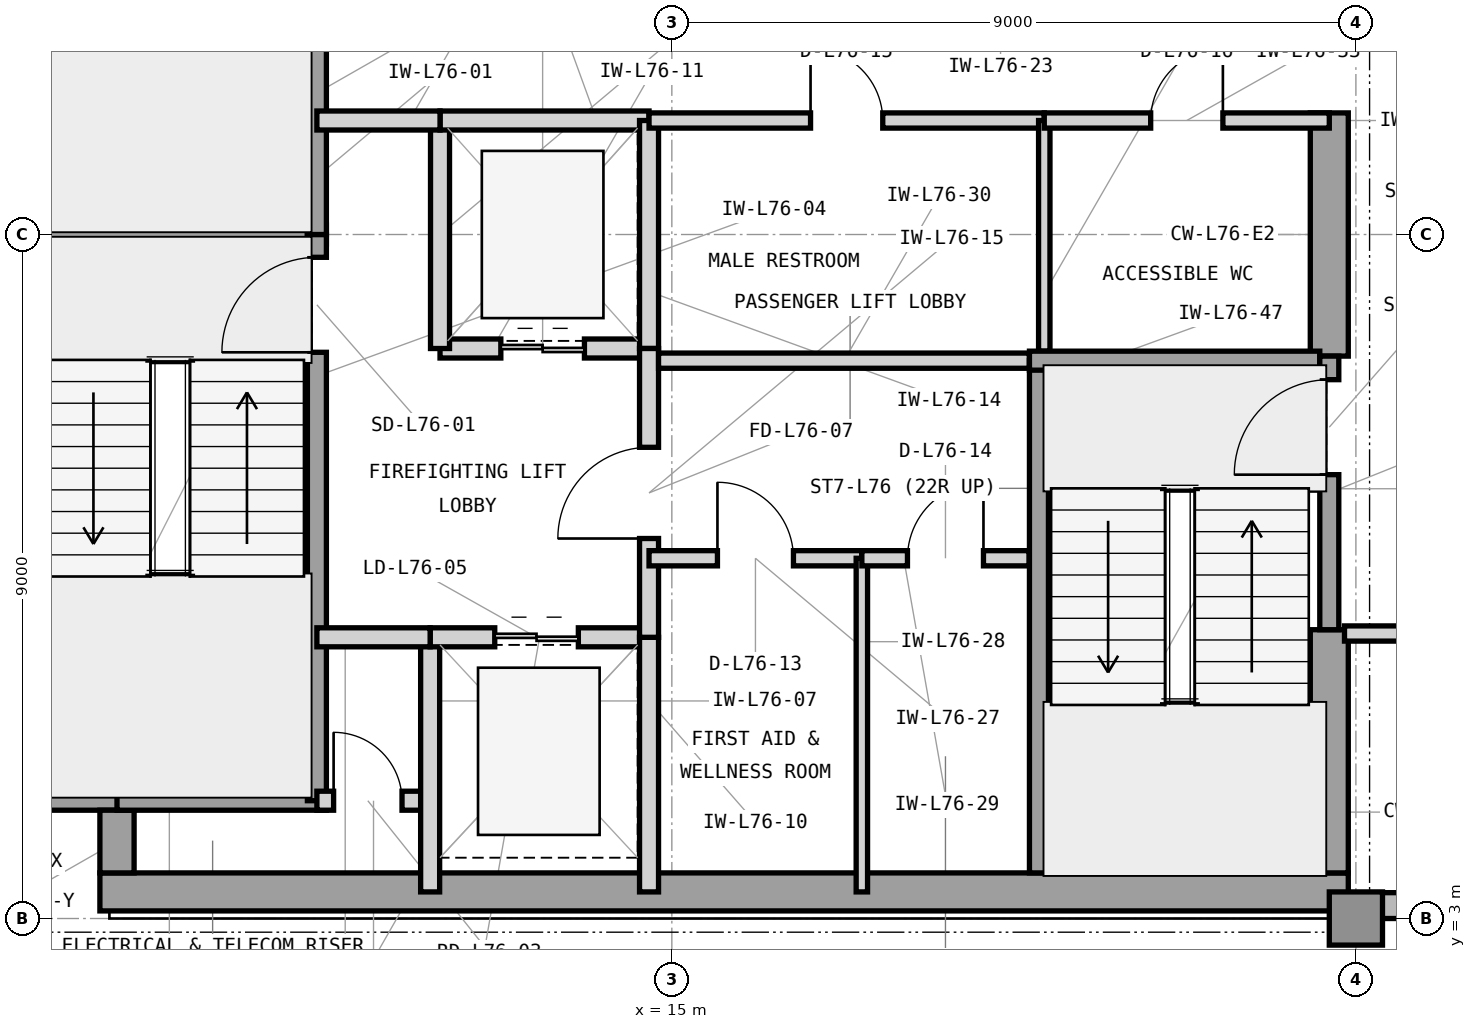
"""IFC4 building model, lengths in metres.
Left out: names, types, materials, properties, quantities, classifications, styles, units other than length and angle.
Written with IfcOpenShell. Run it as: python <this file> out.ifc"""

import sys

from ifc_helpers import new_model, si_unit, direction, frame, frame_2d, origin, origin_2d, place, context, subcontext, project, spatial, rectangle, extrude, element, fill, save


model = new_model("IFC4")
c1 = context("Model", 3, precision=1e-05, world=origin(), true_north=direction((0.0, 1.0)))
c2 = subcontext(c1, "Body", "Model", "MODEL_VIEW")
j1 = project(units=[si_unit("LENGTHUNIT", "METRE"), si_unit("PLANEANGLEUNIT", "RADIAN")], contexts=[c1])
p1 = place(None, origin())
s1 = spatial("IfcSite", under=j1, at=p1, CompositionType="ELEMENT")
p2 = place(p1, origin())
s2 = spatial("IfcBuilding", under=s1, at=p2, CompositionType="ELEMENT")
p3 = place(p2, frame((0.0, 0.0, 309.3)))
s3 = spatial("IfcBuildingStorey", under=s2, at=p3, CompositionType="ELEMENT", Elevation=309.3)
p4 = place(p3, frame((7.475, 3.35, 0.0), z_axis=(0.0, 0.0, 1.0), x_axis=(1.0, 0.0, 0.0)))
e1 = element("IfcWall", 1, at=p4, inside=s3, PredefinedType="SHEAR", context=c2, shape_type="SweptSolid", body=[
    extrude(rectangle(XDim=16.425, YDim=0.5, at=frame_2d((8.212, 0.0))), origin(), (0.0, 0.0, 1.0), 3.9),
])
p5 = place(p3, frame((23.65, 3.6, 0.0), z_axis=(0.0, 0.0, 1.0), x_axis=(0.0, 1.0, 0.0)))
e2 = element("IfcWall", 2, at=p5, inside=s3, PredefinedType="SHEAR", context=c2, shape_type="SweptSolid", body=[
    extrude(rectangle(XDim=3.2, YDim=0.5, at=frame_2d((1.6, 0.0))), origin(), (0.0, 0.0, 1.0), 3.9),
])
p6 = place(p3, frame((23.65, 10.4, 0.0), z_axis=(0.0, 0.0, 1.0), x_axis=(0.0, 1.0, 0.0)))
e3 = element("IfcWall", 3, at=p6, inside=s3, PredefinedType="SHEAR", context=c2, shape_type="SweptSolid", body=[
    extrude(rectangle(XDim=3.2, YDim=0.5, at=frame_2d((1.6, 0.0))), origin(), (0.0, 0.0, 1.0), 3.9),
])
p7 = place(p3, frame((6.6, 4.65, 0.0), z_axis=(0.0, 0.0, 1.0), x_axis=(1.0, 0.0, 0.0)))
e4 = element("IfcWall", 4, at=p7, inside=s3, PredefinedType="SHEAR", context=c2, shape_type="SweptSolid", body=[
    extrude(rectangle(XDim=1.325, YDim=0.45, at=frame_2d((0.663, 0.0))), origin(), (0.0, 0.0, 1.0), 3.9),
])
p8 = place(p3, frame((7.7, 3.6, 0.0), z_axis=(0.0, 0.0, 1.0), x_axis=(0.0, 1.0, 0.0)))
e5 = element("IfcWall", 5, at=p8, inside=s3, PredefinedType="SHEAR", context=c2, shape_type="SweptSolid", body=[
    extrude(rectangle(XDim=0.825, YDim=0.45, at=frame_2d((0.413, 0.0))), origin(), (0.0, 0.0, 1.0), 3.9),
])
p9 = place(p3, frame((24.0, 3.0, 0.0), z_axis=(0.0, 0.0, 1.0), x_axis=(1.0, 0.0, 0.0)))
e6 = element("IfcColumn", 6, at=p9, inside=s3, PredefinedType="COLUMN", context=c2, shape_type="SweptSolid", body=[
    extrude(rectangle(XDim=0.7, YDim=0.7, at=origin_2d()), origin(), (0.0, 0.0, 1.0), 3.9),
])
p10 = place(p3, frame((23.9, 3.17, 0.0), z_axis=(0.0, 0.0, 1.0), x_axis=(1.0, 0.0, 0.0)))
e7 = element("IfcWall", 7, at=p10, inside=s3, PredefinedType="STANDARD", context=c2, shape_type="SweptSolid", body=[
    extrude(rectangle(XDim=25.5, YDim=0.34, at=frame_2d((12.75, 0.0))), origin(), (0.0, 0.0, 1.0), 3.62),
])
p11 = place(p10, frame((1.6, 0.0, 0.8)))
e8 = element("IfcOpeningElement", 8, at=p11, cuts=e7, PredefinedType="OPENING", context=c2, shape_type="SweptSolid", body=[
    extrude(rectangle(XDim=1.9, YDim=2.35, at=frame_2d((0.95, 1.175))), frame((0.0, 0.18, 0.0), z_axis=(0.0, -1.0, 0.0), x_axis=(1.0, 0.0, 0.0)), (0.0, 0.0, 1.0), 0.36),
])
p12 = place(p10, frame((11.45, 0.0, 0.8)))
e9 = element("IfcOpeningElement", 9, at=p12, cuts=e7, PredefinedType="OPENING", context=c2, shape_type="SweptSolid", body=[
    extrude(rectangle(XDim=2.6, YDim=2.35, at=frame_2d((1.3, 1.175))), frame((0.0, 0.18, 0.0), z_axis=(0.0, -1.0, 0.0), x_axis=(1.0, 0.0, 0.0)), (0.0, 0.0, 1.0), 0.36),
])
p13 = place(p10, frame((18.625, 0.0, 0.8)))
e10 = element("IfcOpeningElement", 10, at=p13, cuts=e7, PredefinedType="OPENING", context=c2, shape_type="SweptSolid", body=[
    extrude(rectangle(XDim=1.9, YDim=2.35, at=frame_2d((0.95, 1.175))), frame((0.0, 0.18, 0.0), z_axis=(0.0, -1.0, 0.0), x_axis=(1.0, 0.0, 0.0)), (0.0, 0.0, 1.0), 0.36),
])
p14 = place(p3, frame((6.35, 12.0, 0.0), z_axis=(0.0, 0.0, 1.0), x_axis=(1.0, 0.0, 0.0)))
e11 = element("IfcWall", 11, at=p14, inside=s3, PredefinedType="SHEAR", context=c2, shape_type="SweptSolid", body=[
    extrude(rectangle(XDim=4.105, YDim=0.25, at=frame_2d((2.052, 0.0))), origin(), (0.0, 0.0, 1.0), 3.9),
])
p15 = place(p3, frame((7.7, 4.55, 0.0), z_axis=(0.0, 0.0, 1.0), x_axis=(1.0, 0.0, 0.0)))
e12 = element("IfcWall", 12, at=p15, inside=s3, PredefinedType="SHEAR", context=c2, shape_type="SweptSolid", body=[
    extrude(rectangle(XDim=2.755, YDim=0.25, at=frame_2d((1.377, 0.0))), origin(), (0.0, 0.0, 1.0), 3.9),
])
p16 = place(p3, frame((10.33, 4.55, 0.0), z_axis=(0.0, 0.0, 1.0), x_axis=(0.0, 1.0, 0.0)))
e13 = element("IfcWall", 13, at=p16, inside=s3, PredefinedType="SHEAR", context=c2, shape_type="SweptSolid", body=[
    extrude(rectangle(XDim=7.45, YDim=0.25, at=frame_2d((3.725, 0.0))), origin(), (0.0, 0.0, 1.0), 3.9),
])
p17 = place(p16, frame((5.9, 0.0, 0.0)))
e14 = element("IfcOpeningElement", 14, at=p17, cuts=e13, PredefinedType="OPENING", context=c2, shape_type="SweptSolid", body=[
    extrude(rectangle(XDim=1.25, YDim=2.2, at=frame_2d((0.625, 1.1))), frame((0.0, 0.135, 0.0), z_axis=(0.0, -1.0, 0.0), x_axis=(1.0, 0.0, 0.0)), (0.0, 0.0, 1.0), 0.27),
])
p18 = place(p3, frame((10.33, 12.0, 0.0), z_axis=(0.0, 0.0, 1.0), x_axis=(0.0, 1.0, 0.0)))
e15 = element("IfcWall", 15, at=p18, inside=s3, PredefinedType="SHEAR", context=c2, shape_type="SweptSolid", body=[
    extrude(rectangle(XDim=7.45, YDim=0.25, at=frame_2d((3.725, 0.0))), origin(), (0.0, 0.0, 1.0), 3.9),
])
p19 = place(p18, frame((5.85, 0.0, 0.0)))
e16 = element("IfcOpeningElement", 16, at=p19, cuts=e15, PredefinedType="OPENING", context=c2, shape_type="SweptSolid", body=[
    extrude(rectangle(XDim=1.25, YDim=2.2, at=frame_2d((0.625, 1.1))), frame((0.0, 0.135, 0.0), z_axis=(0.0, -1.0, 0.0), x_axis=(1.0, 0.0, 0.0)), (0.0, 0.0, 1.0), 0.27),
])
p20 = place(p3, frame((10.33, 4.55, 0.0), z_axis=(0.0, 0.0, 1.0), x_axis=(1.0, 0.0, 0.0)))
e17 = element("IfcWall", 17, at=p20, inside=s3, PredefinedType="PARTITIONING", context=c2, shape_type="SweptSolid", body=[
    extrude(rectangle(XDim=1.49, YDim=0.25, at=frame_2d((0.745, 0.0))), origin(), (0.0, 0.0, 1.0), 3.61),
])
p21 = place(p20, frame((0.22, 0.0, 0.0)))
e18 = element("IfcOpeningElement", 18, at=p21, cuts=e17, PredefinedType="OPENING", context=c2, shape_type="SweptSolid", body=[
    extrude(rectangle(XDim=0.9, YDim=2.1, at=frame_2d((0.45, 1.05))), frame((0.0, 0.135, 0.0), z_axis=(0.0, -1.0, 0.0), x_axis=(1.0, 0.0, 0.0)), (0.0, 0.0, 1.0), 0.27),
])
p22 = place(p3, frame((11.82, 3.35, 0.0), z_axis=(0.0, 0.0, 1.0), x_axis=(0.0, 1.0, 0.0)))
e19 = element("IfcWall", 19, at=p22, inside=s3, PredefinedType="PARTITIONING", context=c2, shape_type="SweptSolid", body=[
    extrude(rectangle(XDim=3.35, YDim=0.25, at=frame_2d((1.675, 0.0))), origin(), (0.0, 0.0, 1.0), 3.61),
])
p23 = place(p3, frame((11.82, 6.7, 0.0), z_axis=(0.0, 0.0, 1.0), x_axis=(1.0, 0.0, 0.0)))
e20 = element("IfcWall", 20, at=p23, inside=s3, PredefinedType="PARTITIONING", context=c2, shape_type="SweptSolid", body=[
    extrude(rectangle(XDim=2.88, YDim=0.25, at=frame_2d((1.44, 0.0))), origin(), (0.0, 0.0, 1.0), 3.203),
])
p24 = place(p23, frame((0.85, 0.0, 0.0)))
e21 = element("IfcOpeningElement", 21, at=p24, cuts=e20, PredefinedType="OPENING", context=c2, shape_type="SweptSolid", body=[
    extrude(rectangle(XDim=1.1, YDim=2.25, at=frame_2d((0.55, 1.125))), frame((0.0, 0.135, 0.0), z_axis=(0.0, -1.0, 0.0), x_axis=(1.0, 0.0, 0.0)), (0.0, 0.0, 1.0), 0.27),
])
p25 = place(p3, frame((14.7, 3.35, 0.0), z_axis=(0.0, 0.0, 1.0), x_axis=(0.0, 1.0, 0.0)))
e22 = element("IfcWall", 22, at=p25, inside=s3, PredefinedType="PARTITIONING", context=c2, shape_type="SweptSolid", body=[
    extrude(rectangle(XDim=3.35, YDim=0.25, at=frame_2d((1.675, 0.0))), origin(), (0.0, 0.0, 1.0), 3.61),
])
p26 = place(p3, frame((11.95, 10.5, 0.0), z_axis=(0.0, 0.0, 1.0), x_axis=(1.0, 0.0, 0.0)))
e23 = element("IfcWall", 23, at=p26, inside=s3, PredefinedType="PARTITIONING", context=c2, shape_type="SweptSolid", body=[
    extrude(rectangle(XDim=2.75, YDim=0.25, at=frame_2d((1.375, 0.0))), origin(), (0.0, 0.0, 1.0), 3.203),
])
p27 = place(p26, frame((0.8, 0.0, 0.0)))
e24 = element("IfcOpeningElement", 24, at=p27, cuts=e23, PredefinedType="OPENING", context=c2, shape_type="SweptSolid", body=[
    extrude(rectangle(XDim=1.1, YDim=2.25, at=frame_2d((0.55, 1.125))), frame((0.0, 0.135, 0.0), z_axis=(0.0, -1.0, 0.0), x_axis=(1.0, 0.0, 0.0)), (0.0, 0.0, 1.0), 0.27),
])
p28 = place(p3, frame((11.95, 10.5, 0.0), z_axis=(0.0, 0.0, 1.0), x_axis=(0.0, 1.0, 0.0)))
e25 = element("IfcWall", 25, at=p28, inside=s3, PredefinedType="PARTITIONING", context=c2, shape_type="SweptSolid", body=[
    extrude(rectangle(XDim=3.0, YDim=0.25, at=frame_2d((1.5, 0.0))), origin(), (0.0, 0.0, 1.0), 3.61),
])
p29 = place(p3, frame((11.95, 13.5, 0.0), z_axis=(0.0, 0.0, 1.0), x_axis=(1.0, 0.0, 0.0)))
e26 = element("IfcWall", 26, at=p29, inside=s3, PredefinedType="PARTITIONING", context=c2, shape_type="SweptSolid", body=[
    extrude(rectangle(XDim=2.75, YDim=0.25, at=frame_2d((1.375, 0.0))), origin(), (0.0, 0.0, 1.0), 3.203),
])
p30 = place(p3, frame((14.7, 10.5, 0.0), z_axis=(0.0, 0.0, 1.0), x_axis=(0.0, 1.0, 0.0)))
e27 = element("IfcWall", 27, at=p30, inside=s3, PredefinedType="PARTITIONING", context=c2, shape_type="SweptSolid", body=[
    extrude(rectangle(XDim=3.0, YDim=0.25, at=frame_2d((1.5, 0.0))), origin(), (0.0, 0.0, 1.0), 3.61),
])
p31 = place(p3, frame((14.7, 6.7, 0.0), z_axis=(0.0, 0.0, 1.0), x_axis=(0.0, 1.0, 0.0)))
e28 = element("IfcWall", 28, at=p31, inside=s3, PredefinedType="PARTITIONING", context=c2, shape_type="SweptSolid", body=[
    extrude(rectangle(XDim=3.8, YDim=0.25, at=frame_2d((1.9, 0.0))), origin(), (0.0, 0.0, 1.0), 3.61),
])
p32 = place(p31, frame((1.3, 0.0, 0.0)))
e29 = element("IfcOpeningElement", 29, at=p32, cuts=e28, PredefinedType="OPENING", context=c2, shape_type="SweptSolid", body=[
    extrude(rectangle(XDim=1.2, YDim=2.2, at=frame_2d((0.6, 1.1))), frame((0.0, 0.135, 0.0), z_axis=(0.0, -1.0, 0.0), x_axis=(1.0, 0.0, 0.0)), (0.0, 0.0, 1.0), 0.27),
])
p33 = place(p3, frame((10.33, 13.5, 0.0), z_axis=(0.0, 0.0, 1.0), x_axis=(1.0, 0.0, 0.0)))
e30 = element("IfcWall", 30, at=p33, inside=s3, PredefinedType="PARTITIONING", context=c2, shape_type="SweptSolid", body=[
    extrude(rectangle(XDim=1.62, YDim=0.25, at=frame_2d((0.81, 0.0))), origin(), (0.0, 0.0, 1.0), 3.203),
])
p34 = place(p3, frame((10.33, 6.7, 0.0), z_axis=(0.0, 0.0, 1.0), x_axis=(1.0, 0.0, 0.0)))
e31 = element("IfcWall", 31, at=p34, inside=s3, PredefinedType="PARTITIONING", context=c2, shape_type="SweptSolid", body=[
    extrude(rectangle(XDim=1.49, YDim=0.25, at=frame_2d((0.745, 0.0))), origin(), (0.0, 0.0, 1.0), 3.203),
])
p35 = place(p3, frame((14.7, 7.74, 0.0), z_axis=(0.0, 0.0, 1.0), x_axis=(1.0, 0.0, 0.0)))
e32 = element("IfcWall", 32, at=p35, inside=s3, PredefinedType="PARTITIONING", context=c2, shape_type="SweptSolid", body=[
    extrude(rectangle(XDim=2.8, YDim=0.2, at=frame_2d((1.4, 0.0))), origin(), (0.0, 0.0, 1.0), 3.61),
])
p36 = place(p35, frame((0.9, 0.0, 0.0)))
e33 = element("IfcOpeningElement", 33, at=p36, cuts=e32, PredefinedType="OPENING", context=c2, shape_type="SweptSolid", body=[
    extrude(rectangle(XDim=1.0, YDim=2.15, at=frame_2d((0.5, 1.075))), frame((0.0, 0.11, 0.0), z_axis=(0.0, -1.0, 0.0), x_axis=(1.0, 0.0, 0.0)), (0.0, 0.0, 1.0), 0.22),
])
p37 = place(p3, frame((17.5, 3.35, 0.0), z_axis=(0.0, 0.0, 1.0), x_axis=(0.0, 1.0, 0.0)))
e34 = element("IfcWall", 34, at=p37, inside=s3, PredefinedType="PARTITIONING", context=c2, shape_type="SweptSolid", body=[
    extrude(rectangle(XDim=4.39, YDim=0.15, at=frame_2d((2.195, 0.0))), origin(), (0.0, 0.0, 1.0), 3.61),
])
p38 = place(p3, frame((17.5, 7.74, 0.0), z_axis=(0.0, 0.0, 1.0), x_axis=(1.0, 0.0, 0.0)))
e35 = element("IfcWall", 35, at=p38, inside=s3, PredefinedType="PARTITIONING", context=c2, shape_type="SweptSolid", body=[
    extrude(rectangle(XDim=2.2, YDim=0.2, at=frame_2d((1.1, 0.0))), origin(), (0.0, 0.0, 1.0), 3.61),
])
p39 = place(p38, frame((0.6, 0.0, 0.0)))
e36 = element("IfcOpeningElement", 36, at=p39, cuts=e35, PredefinedType="OPENING", context=c2, shape_type="SweptSolid", body=[
    extrude(rectangle(XDim=1.0, YDim=2.15, at=frame_2d((0.5, 1.075))), frame((0.0, 0.11, 0.0), z_axis=(0.0, -1.0, 0.0), x_axis=(1.0, 0.0, 0.0)), (0.0, 0.0, 1.0), 0.22),
])
p40 = place(p3, frame((14.825, 10.34, 0.0), z_axis=(0.0, 0.0, 1.0), x_axis=(1.0, 0.0, 0.0)))
e37 = element("IfcWall", 37, at=p40, inside=s3, PredefinedType="PARTITIONING", context=c2, shape_type="SweptSolid", body=[
    extrude(rectangle(XDim=4.88, YDim=0.2, at=frame_2d((2.44, 0.0))), origin(), (0.0, 0.0, 1.0), 3.61),
])
p41 = place(p3, frame((14.7, 13.5, 0.0), z_axis=(0.0, 0.0, 1.0), x_axis=(1.0, 0.0, 0.0)))
e38 = element("IfcWall", 38, at=p41, inside=s3, PredefinedType="PARTITIONING", context=c2, shape_type="SweptSolid", body=[
    extrude(rectangle(XDim=5.2, YDim=0.2, at=frame_2d((2.6, 0.0))), origin(), (0.0, 0.0, 1.0), 3.203),
])
p42 = place(p41, frame((2.125, 0.0, 0.0)))
e39 = element("IfcOpeningElement", 39, at=p42, cuts=e38, PredefinedType="OPENING", context=c2, shape_type="SweptSolid", body=[
    extrude(rectangle(XDim=0.95, YDim=2.1, at=frame_2d((0.475, 1.05))), frame((0.0, 0.11, 0.0), z_axis=(0.0, -1.0, 0.0), x_axis=(1.0, 0.0, 0.0)), (0.0, 0.0, 1.0), 0.22),
])
p43 = place(p3, frame((19.9, 10.465, 0.0), z_axis=(0.0, 0.0, 1.0), x_axis=(0.0, 1.0, 0.0)))
e40 = element("IfcWall", 40, at=p43, inside=s3, PredefinedType="PARTITIONING", context=c2, shape_type="SweptSolid", body=[
    extrude(rectangle(XDim=3.035, YDim=0.15, at=frame_2d((1.518, 0.0))), origin(), (0.0, 0.0, 1.0), 3.61),
])
p44 = place(p3, frame((19.9, 13.5, 0.0), z_axis=(0.0, 0.0, 1.0), x_axis=(1.0, 0.0, 0.0)))
e41 = element("IfcWall", 41, at=p44, inside=s3, PredefinedType="PARTITIONING", context=c2, shape_type="SweptSolid", body=[
    extrude(rectangle(XDim=3.75, YDim=0.2, at=frame_2d((1.875, 0.0))), origin(), (0.0, 0.0, 1.0), 3.203),
])
p45 = place(p44, frame((1.4, 0.0, 0.0)))
e42 = element("IfcOpeningElement", 42, at=p45, cuts=e41, PredefinedType="OPENING", context=c2, shape_type="SweptSolid", body=[
    extrude(rectangle(XDim=0.95, YDim=2.1, at=frame_2d((0.475, 1.05))), frame((0.0, 0.11, 0.0), z_axis=(0.0, -1.0, 0.0), x_axis=(1.0, 0.0, 0.0)), (0.0, 0.0, 1.0), 0.22),
])
p46 = place(p3, frame((23.85, 6.75, 0.0), z_axis=(0.0, 0.0, 1.0), x_axis=(1.0, 0.0, 0.0)))
e43 = element("IfcWall", 43, at=p46, inside=s3, PredefinedType="PARTITIONING", context=c2, shape_type="SweptSolid", body=[
    extrude(rectangle(XDim=7.35, YDim=0.2, at=frame_2d((3.675, 0.0))), origin(), (0.0, 0.0, 1.0), 3.61),
])
p47 = place(p46, frame((2.8, 0.0, 0.0)))
e44 = element("IfcOpeningElement", 44, at=p47, cuts=e43, PredefinedType="OPENING", context=c2, shape_type="SweptSolid", body=[
    extrude(rectangle(XDim=1.0, YDim=2.15, at=frame_2d((0.5, 1.075))), frame((0.0, 0.11, 0.0), z_axis=(0.0, -1.0, 0.0), x_axis=(1.0, 0.0, 0.0)), (0.0, 0.0, 1.0), 0.22),
])
p48 = place(p3, frame((19.83, 3.6, 0.0), z_axis=(0.0, 0.0, 1.0), x_axis=(0.0, 1.0, 0.0)))
e45 = element("IfcWall", 45, at=p48, inside=s3, PredefinedType="SHEAR", context=c2, shape_type="SweptSolid", body=[
    extrude(rectangle(XDim=6.74, YDim=0.25, at=frame_2d((3.37, 0.0))), origin(), (0.0, 0.0, 1.0), 3.9),
])
p49 = place(p3, frame((19.705, 10.34, 0.0), z_axis=(0.0, 0.0, 1.0), x_axis=(1.0, 0.0, 0.0)))
e46 = element("IfcWall", 46, at=p49, inside=s3, PredefinedType="SHEAR", context=c2, shape_type="SweptSolid", body=[
    extrude(rectangle(XDim=3.82, YDim=0.25, at=frame_2d((1.91, 0.0))), origin(), (0.0, 0.0, 1.0), 3.9),
])
p50 = place(p3, frame((23.65, 6.8, 0.0), z_axis=(0.0, 0.0, 1.0), x_axis=(0.0, 1.0, 0.0)))
e47 = element("IfcWall", 47, at=p50, inside=s3, PredefinedType="SHEAR", context=c2, shape_type="SweptSolid", body=[
    extrude(rectangle(XDim=3.6, YDim=0.25, at=frame_2d((1.8, 0.0))), origin(), (0.0, 0.0, 1.0), 3.9),
])
p51 = place(p50, frame((2.04, 0.0, 0.0)))
e48 = element("IfcOpeningElement", 48, at=p51, cuts=e47, PredefinedType="OPENING", context=c2, shape_type="SweptSolid", body=[
    extrude(rectangle(XDim=1.25, YDim=2.2, at=frame_2d((0.625, 1.1))), frame((0.0, 0.135, 0.0), z_axis=(0.0, -1.0, 0.0), x_axis=(1.0, 0.0, 0.0)), (0.0, 0.0, 1.0), 0.27),
])
p52 = place(p17, origin())
e49 = element("IfcDoor", 49, at=p52, inside=s3, OperationType="SINGLE_SWING_LEFT", PredefinedType="DOOR", context=c2, shape_type="SweptSolid", body=[
    extrude(rectangle(XDim=1.25, YDim=2.2, at=frame_2d((0.625, 1.1))), frame((0.0, 0.025, 0.0), z_axis=(0.0, -1.0, 0.0), x_axis=(1.0, 0.0, 0.0)), (0.0, 0.0, 1.0), 0.05),
])
fill(e14, e49)
p53 = place(p21, origin())
e50 = element("IfcDoor", 50, at=p53, inside=s3, OperationType="SINGLE_SWING_LEFT", PredefinedType="TRAPDOOR", context=c2, shape_type="SweptSolid", body=[
    extrude(rectangle(XDim=0.9, YDim=2.1, at=frame_2d((0.45, 1.05))), frame((0.0, 0.025, 0.0), z_axis=(0.0, -1.0, 0.0), x_axis=(1.0, 0.0, 0.0)), (0.0, 0.0, 1.0), 0.05),
])
fill(e18, e50)
p54 = place(p24, origin())
e51 = element("IfcDoor", 51, at=p54, inside=s3, OperationType="DOUBLE_DOOR_SLIDING", PredefinedType="DOOR", context=c2, shape_type="SweptSolid", body=[
    extrude(rectangle(XDim=1.1, YDim=2.25, at=frame_2d((0.55, 1.125))), frame((0.0, 0.025, 0.0), z_axis=(0.0, -1.0, 0.0), x_axis=(1.0, 0.0, 0.0)), (0.0, 0.0, 1.0), 0.05),
])
fill(e21, e51)
p55 = place(p27, origin())
e52 = element("IfcDoor", 52, at=p55, inside=s3, OperationType="DOUBLE_DOOR_SLIDING", PredefinedType="DOOR", context=c2, shape_type="SweptSolid", body=[
    extrude(rectangle(XDim=1.1, YDim=2.25, at=frame_2d((0.55, 1.125))), frame((0.0, 0.025, 0.0), z_axis=(0.0, -1.0, 0.0), x_axis=(1.0, 0.0, 0.0)), (0.0, 0.0, 1.0), 0.05),
])
fill(e24, e52)
p56 = place(p32, origin())
e53 = element("IfcDoor", 53, at=p56, inside=s3, OperationType="SINGLE_SWING_LEFT", PredefinedType="DOOR", context=c2, shape_type="SweptSolid", body=[
    extrude(rectangle(XDim=1.2, YDim=2.2, at=frame_2d((0.6, 1.1))), frame((0.0, 0.025, 0.0), z_axis=(0.0, -1.0, 0.0), x_axis=(1.0, 0.0, 0.0)), (0.0, 0.0, 1.0), 0.05),
])
fill(e29, e53)
p57 = place(p36, origin())
e54 = element("IfcDoor", 54, at=p57, inside=s3, OperationType="SINGLE_SWING_LEFT", PredefinedType="DOOR", context=c2, shape_type="SweptSolid", body=[
    extrude(rectangle(XDim=1.0, YDim=2.15, at=frame_2d((0.5, 1.075))), frame((0.0, 0.025, 0.0), z_axis=(0.0, -1.0, 0.0), x_axis=(1.0, 0.0, 0.0)), (0.0, 0.0, 1.0), 0.05),
])
fill(e33, e54)
p58 = place(p39, origin())
e55 = element("IfcDoor", 55, at=p58, inside=s3, OperationType="SINGLE_SWING_RIGHT", PredefinedType="DOOR", context=c2, shape_type="SweptSolid", body=[
    extrude(rectangle(XDim=1.0, YDim=2.15, at=frame_2d((0.5, 1.075))), frame((0.0, 0.025, 0.0), z_axis=(0.0, -1.0, 0.0), x_axis=(1.0, 0.0, 0.0)), (0.0, 0.0, 1.0), 0.05),
])
fill(e36, e55)
p59 = place(p42, origin())
e56 = element("IfcDoor", 56, at=p59, inside=s3, OperationType="SINGLE_SWING_LEFT", PredefinedType="DOOR", context=c2, shape_type="SweptSolid", body=[
    extrude(rectangle(XDim=0.95, YDim=2.1, at=frame_2d((0.475, 1.05))), frame((0.0, 0.025, 0.0), z_axis=(0.0, -1.0, 0.0), x_axis=(1.0, 0.0, 0.0)), (0.0, 0.0, 1.0), 0.05),
])
fill(e39, e56)
p60 = place(p45, origin())
e57 = element("IfcDoor", 57, at=p60, inside=s3, OperationType="SINGLE_SWING_RIGHT", PredefinedType="DOOR", context=c2, shape_type="SweptSolid", body=[
    extrude(rectangle(XDim=0.95, YDim=2.1, at=frame_2d((0.475, 1.05))), frame((0.0, 0.025, 0.0), z_axis=(0.0, -1.0, 0.0), x_axis=(1.0, 0.0, 0.0)), (0.0, 0.0, 1.0), 0.05),
])
fill(e42, e57)
p61 = place(p51, origin())
e58 = element("IfcDoor", 58, at=p61, inside=s3, OperationType="SINGLE_SWING_LEFT", PredefinedType="DOOR", context=c2, shape_type="SweptSolid", body=[
    extrude(rectangle(XDim=1.25, YDim=2.2, at=frame_2d((0.625, 1.1))), frame((0.0, 0.025, 0.0), z_axis=(0.0, -1.0, 0.0), x_axis=(1.0, 0.0, 0.0)), (0.0, 0.0, 1.0), 0.05),
])
fill(e48, e58)
save(model, sys.argv[1])
